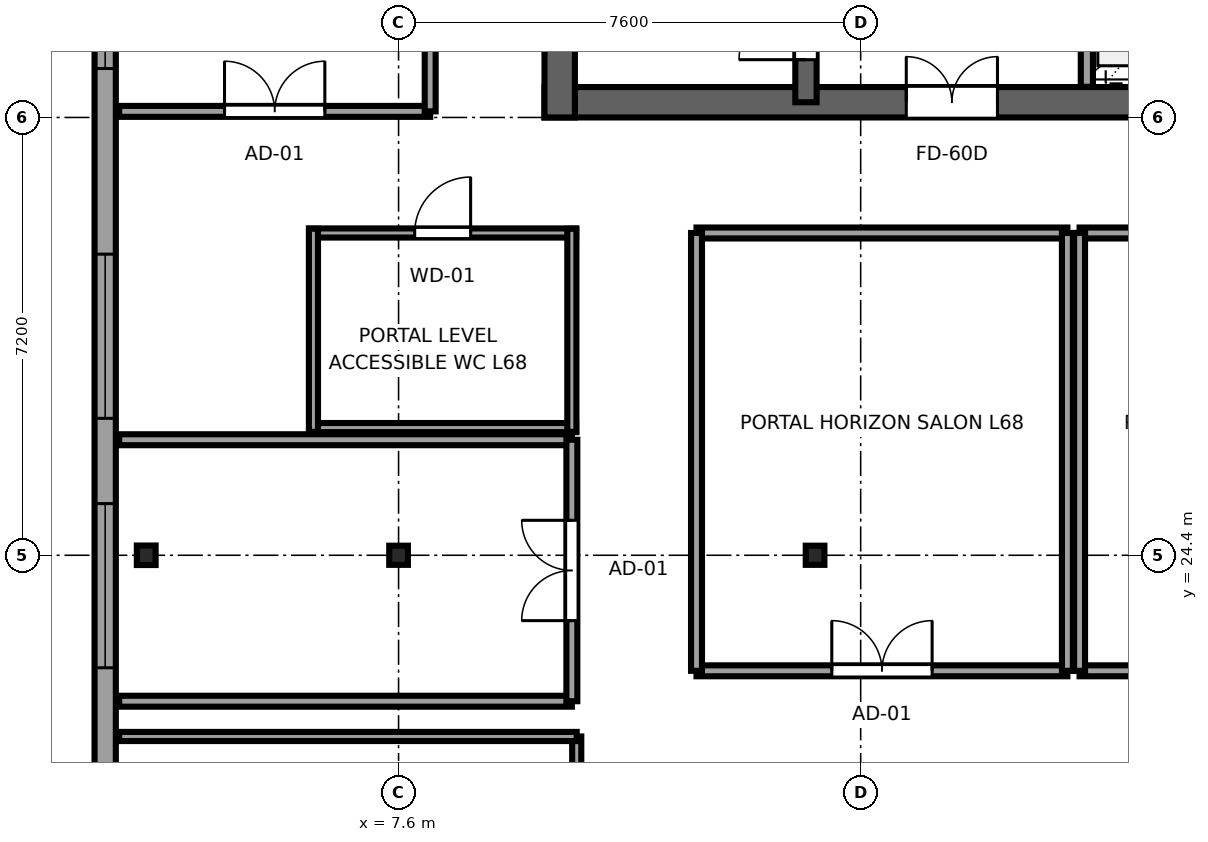
"""IFC4 building model, lengths in metres.
Left out: names, types, materials, properties, quantities, classifications, styles, units other than length and angle.
Written with IfcOpenShell. Run it as: python <this file> out.ifc"""

import sys

from ifc_helpers import new_model, si_unit, direction, frame, frame_2d, origin, origin_2d, place, context, subcontext, project, spatial, rectangle, i_section, extrude, source, transform, mapped, element, fill, save


model = new_model("IFC4")
c1 = context("Model", 3, precision=1e-05, world=origin(), true_north=direction((0.0, 1.0)))
c2 = subcontext(c1, "Body", "Model", "MODEL_VIEW")
j1 = project(units=[si_unit("LENGTHUNIT", "METRE"), si_unit("PLANEANGLEUNIT", "RADIAN")], contexts=[c1])
p1 = place(None, origin())
s1 = spatial("IfcSite", under=j1, at=p1, CompositionType="ELEMENT")
p2 = place(p1, origin())
s2 = spatial("IfcBuilding", under=s1, at=p2, CompositionType="ELEMENT")
p3 = place(p2, frame((0.0, 0.0, 255.85)))
s3 = spatial("IfcBuildingStorey", under=s2, at=p3, CompositionType="ELEMENT", Elevation=255.85)
p4 = place(p3, frame((10.0, 31.85, 0.0), z_axis=(0.0, 0.0, 1.0), x_axis=(1.0, 0.0, 0.0)))
e1 = element("IfcWall", 1, at=p4, inside=s3, PredefinedType="SHEAR", context=c2, shape_type="SweptSolid", body=[
    extrude(rectangle(XDim=26.0, YDim=0.5, at=frame_2d((13.0, 0.0))), origin(), (0.0, 0.0, 1.0), 3.55),
])
p5 = place(p4, frame((7.45, 0.0, 0.0), z_axis=(0.0, 0.0, 1.0), x_axis=(-1.0, 0.0, 0.0)))
e2 = element("IfcOpeningElement", 2, at=p5, cuts=e1, PredefinedType="OPENING", context=c2, shape_type="SweptSolid", body=[
    extrude(rectangle(XDim=1.5, YDim=2.04, at=frame_2d((0.75, 1.02))), frame((0.0, 0.26, 0.0), z_axis=(0.0, -1.0, 0.0), x_axis=(1.0, 0.0, 0.0)), (0.0, 0.0, 1.0), 0.52),
])
p6 = place(p4, frame((13.75, 0.0, 0.0), z_axis=(0.0, 0.0, 1.0), x_axis=(-1.0, 0.0, 0.0)))
e3 = element("IfcOpeningElement", 3, at=p6, cuts=e1, PredefinedType="OPENING", context=c2, shape_type="SweptSolid", body=[
    extrude(rectangle(XDim=1.5, YDim=2.04, at=frame_2d((0.75, 1.02))), frame((0.0, 0.26, 0.0), z_axis=(0.0, -1.0, 0.0), x_axis=(1.0, 0.0, 0.0)), (0.0, 0.0, 1.0), 0.52),
])
p7 = place(p4, frame((20.05, 0.0, 0.0), z_axis=(0.0, 0.0, 1.0), x_axis=(-1.0, 0.0, 0.0)))
e4 = element("IfcOpeningElement", 4, at=p7, cuts=e1, PredefinedType="OPENING", context=c2, shape_type="SweptSolid", body=[
    extrude(rectangle(XDim=1.5, YDim=2.04, at=frame_2d((0.75, 1.02))), frame((0.0, 0.26, 0.0), z_axis=(0.0, -1.0, 0.0), x_axis=(1.0, 0.0, 0.0)), (0.0, 0.0, 1.0), 0.52),
])
p8 = place(p3, frame((10.25, 31.6, 0.0), z_axis=(0.0, 0.0, 1.0), x_axis=(0.0, 1.0, 0.0)))
e5 = element("IfcWall", 5, at=p8, inside=s3, PredefinedType="SHEAR", context=c2, shape_type="SweptSolid", body=[
    extrude(rectangle(XDim=13.6, YDim=0.5, at=frame_2d((6.8, 0.0))), origin(), (0.0, 0.0, 1.0), 3.55),
])
p9 = place(p3, frame((14.3, 31.85, 0.0), z_axis=(0.0, 0.0, 1.0), x_axis=(0.0, 1.0, 0.0)))
e6 = element("IfcWall", 6, at=p9, inside=s3, PredefinedType="SHEAR", context=c2, shape_type="SweptSolid", body=[
    extrude(rectangle(XDim=13.1, YDim=0.35, at=frame_2d((6.55, 0.0))), origin(), (0.0, 0.0, 1.0), 3.55),
])
p10 = place(p9, frame((0.7, 0.0, 0.0)))
e7 = element("IfcOpeningElement", 7, at=p10, cuts=e6, PredefinedType="OPENING", context=c2, shape_type="SweptSolid", body=[
    extrude(rectangle(XDim=1.1, YDim=2.12, at=frame_2d((0.55, 1.06))), frame((0.0, 0.185, 0.0), z_axis=(0.0, -1.0, 0.0), x_axis=(1.0, 0.0, 0.0)), (0.0, 0.0, 1.0), 0.37),
])
m1 = source(origin(), c2, "Body", "SweptSolid", [
    extrude(i_section(OverallWidth=0.309, OverallDepth=0.321, WebThickness=0.014, FlangeThickness=0.022, FilletRadius=0.017, at=origin_2d()), origin(), (0.0, 0.0, 1.0), 3.55),
])
p11 = place(p3, frame((3.45, 24.4, 0.0), z_axis=(0.0, 0.0, 1.0), x_axis=(1.0, 0.0, 0.0)))
e8 = element("IfcColumn", 8, at=p11, inside=s3, PredefinedType="COLUMN", context=c2, shape_type="MappedRepresentation", body=[
    mapped(m1, transform((0.0, 0.0, 0.0), x_axis=(1.0, 0.0, 0.0), y_axis=(0.0, 1.0, 0.0), z_axis=(0.0, 0.0, 1.0), scale=1.0)),
])
m2 = source(origin(), c2, "Body", "SweptSolid", [
    extrude(i_section(OverallWidth=0.307, OverallDepth=0.315, WebThickness=0.012, FlangeThickness=0.019, FilletRadius=0.017, at=origin_2d()), origin(), (0.0, 0.0, 1.0), 3.55),
])
for number, where, z_axis, x_axis in (
    (9, (7.6, 24.4, 0.0), (0.0, 0.0, 1.0), (1.0, 0.0, 0.0)),
    (10, (14.45, 24.4, 0.0), (0.0, 0.0, 1.0), (1.0, 0.0, 0.0)),
):
    element("IfcColumn", number, at=place(p3, frame(where, z_axis=z_axis, x_axis=x_axis)), inside=s3, PredefinedType="COLUMN", context=c2, shape_type="MappedRepresentation", body=[
        mapped(m2, transform((0.0, 0.0, 0.0), x_axis=(1.0, 0.0, 0.0), y_axis=(0.0, 1.0, 0.0), z_axis=(0.0, 0.0, 1.0), scale=1.0)),
    ])
p12 = place(p3, frame((2.775, 40.783, 0.0), z_axis=(0.0, 0.0, 1.0), x_axis=(0.0, -1.0, 0.0)))
e11 = element("IfcWall", 11, at=p12, inside=s3, PredefinedType="SOLIDWALL", context=c2, shape_type="SweptSolid", body=[
    extrude(rectangle(XDim=33.766, YDim=0.35, at=frame_2d((16.883, 0.0))), origin(), (0.0, 0.0, 1.0), 3.37),
])
p13 = place(p12, frame((5.678, 0.0, 0.68)))
e12 = element("IfcOpeningElement", 12, at=p13, cuts=e11, PredefinedType="OPENING", context=c2, shape_type="SweptSolid", body=[
    extrude(rectangle(XDim=2.7, YDim=1.95, at=frame_2d((1.35, 0.975))), frame((0.0, 0.185, 0.0), z_axis=(0.0, -1.0, 0.0), x_axis=(1.0, 0.0, 0.0)), (0.0, 0.0, 1.0), 0.37),
])
p14 = place(p12, frame((11.431, 0.0, 0.68)))
e13 = element("IfcOpeningElement", 13, at=p14, cuts=e11, PredefinedType="OPENING", context=c2, shape_type="SweptSolid", body=[
    extrude(rectangle(XDim=2.7, YDim=1.95, at=frame_2d((1.35, 0.975))), frame((0.0, 0.185, 0.0), z_axis=(0.0, -1.0, 0.0), x_axis=(1.0, 0.0, 0.0)), (0.0, 0.0, 1.0), 0.37),
])
p15 = place(p12, frame((15.533, 0.0, 0.68)))
e14 = element("IfcOpeningElement", 14, at=p15, cuts=e11, PredefinedType="OPENING", context=c2, shape_type="SweptSolid", body=[
    extrude(rectangle(XDim=2.7, YDim=1.95, at=frame_2d((1.35, 0.975))), frame((0.0, 0.185, 0.0), z_axis=(0.0, -1.0, 0.0), x_axis=(1.0, 0.0, 0.0)), (0.0, 0.0, 1.0), 0.37),
])
p16 = place(p12, frame((20.185, 0.0, 0.68)))
e15 = element("IfcOpeningElement", 15, at=p16, cuts=e11, PredefinedType="OPENING", context=c2, shape_type="SweptSolid", body=[
    extrude(rectangle(XDim=2.7, YDim=1.95, at=frame_2d((1.35, 0.975))), frame((0.0, 0.185, 0.0), z_axis=(0.0, -1.0, 0.0), x_axis=(1.0, 0.0, 0.0)), (0.0, 0.0, 1.0), 0.37),
])
p17 = place(p12, frame((24.837, 0.0, 0.68)))
e16 = element("IfcOpeningElement", 16, at=p17, cuts=e11, PredefinedType="OPENING", context=c2, shape_type="SweptSolid", body=[
    extrude(rectangle(XDim=2.7, YDim=1.95, at=frame_2d((1.35, 0.975))), frame((0.0, 0.185, 0.0), z_axis=(0.0, -1.0, 0.0), x_axis=(1.0, 0.0, 0.0)), (0.0, 0.0, 1.0), 0.37),
])
p18 = place(p12, frame((29.489, 0.0, 0.68)))
e17 = element("IfcOpeningElement", 17, at=p18, cuts=e11, PredefinedType="OPENING", context=c2, shape_type="SweptSolid", body=[
    extrude(rectangle(XDim=2.7, YDim=1.95, at=frame_2d((1.35, 0.975))), frame((0.0, 0.185, 0.0), z_axis=(0.0, -1.0, 0.0), x_axis=(1.0, 0.0, 0.0)), (0.0, 0.0, 1.0), 0.37),
])
p19 = place(p3, frame((18.92, 32.104, 0.0), z_axis=(0.0, 0.0, 1.0), x_axis=(0.0, 1.0, 0.0)))
e18 = element("IfcWall", 18, at=p19, inside=s3, PredefinedType="SOLIDWALL", context=c2, shape_type="SweptSolid", body=[
    extrude(rectangle(XDim=4.046, YDim=0.2, at=frame_2d((2.023, 0.0))), origin(), (0.0, 0.0, 1.0), 3.37),
])
p20 = place(p3, frame((10.53, 14.61, 0.0), z_axis=(0.0, 0.0, 1.0), x_axis=(0.0, 1.0, 0.0)))
e19 = element("IfcWall", 19, at=p20, inside=s3, PredefinedType="PARTITIONING", context=c2, shape_type="SweptSolid", body=[
    extrude(rectangle(XDim=6.81, YDim=0.15, at=frame_2d((3.405, 0.0))), origin(), (0.0, 0.0, 1.0), 3.37),
])
p21 = place(p20, frame((2.775, 0.0, 0.0)))
e20 = element("IfcOpeningElement", 20, at=p21, cuts=e19, PredefinedType="OPENING", context=c2, shape_type="SweptSolid", body=[
    extrude(rectangle(XDim=1.22, YDim=2.08, at=frame_2d((0.61, 1.04))), frame((0.0, 0.085, 0.0), z_axis=(0.0, -1.0, 0.0), x_axis=(1.0, 0.0, 0.0)), (0.0, 0.0, 1.0), 0.17),
])
p22 = place(p3, frame((3.005, 21.42, 0.0), z_axis=(0.0, 0.0, 1.0), x_axis=(1.0, 0.0, 0.0)))
e21 = element("IfcWall", 21, at=p22, inside=s3, PredefinedType="PARTITIONING", context=c2, shape_type="SweptSolid", body=[
    extrude(rectangle(XDim=7.525, YDim=0.15, at=frame_2d((3.763, 0.0))), origin(), (0.0, 0.0, 1.0), 3.37),
])
p23 = place(p3, frame((12.5, 22.5, 0.0), z_axis=(0.0, 0.0, 1.0), x_axis=(1.0, 0.0, 0.0)))
e22 = element("IfcWall", 22, at=p23, inside=s3, PredefinedType="PARTITIONING", context=c2, shape_type="SweptSolid", body=[
    extrude(rectangle(XDim=6.1, YDim=0.18, at=frame_2d((3.05, 0.0))), origin(), (0.0, 0.0, 1.0), 3.37),
])
p24 = place(p23, frame((2.225, 0.0, 0.0)))
e23 = element("IfcOpeningElement", 23, at=p24, cuts=e22, PredefinedType="OPENING", context=c2, shape_type="SweptSolid", body=[
    extrude(rectangle(XDim=1.65, YDim=2.15, at=frame_2d((0.825, 1.075))), frame((0.0, 0.1, 0.0), z_axis=(0.0, -1.0, 0.0), x_axis=(1.0, 0.0, 0.0)), (0.0, 0.0, 1.0), 0.2),
])
p25 = place(p3, frame((12.5, 29.7, 0.0), z_axis=(0.0, 0.0, 1.0), x_axis=(1.0, 0.0, 0.0)))
e24 = element("IfcWall", 24, at=p25, inside=s3, PredefinedType="PARTITIONING", context=c2, shape_type="SweptSolid", body=[
    extrude(rectangle(XDim=6.1, YDim=0.18, at=frame_2d((3.05, 0.0))), origin(), (0.0, 0.0, 1.0), 3.37),
])
for number, where, z_axis, x_axis in (
    (25, (12.5, 22.5, 0.0), (0.0, 0.0, 1.0), (0.0, 1.0, 0.0)),
    (26, (18.6, 22.5, 0.0), (0.0, 0.0, 1.0), (0.0, 1.0, 0.0)),
):
    element("IfcWall", number, at=place(p3, frame(where, z_axis=z_axis, x_axis=x_axis)), inside=s3, PredefinedType="PARTITIONING", context=c2, shape_type="SweptSolid", body=[
        extrude(rectangle(XDim=7.2, YDim=0.18, at=frame_2d((3.6, 0.0))), origin(), (0.0, 0.0, 1.0), 3.37),
    ])
p26 = place(p3, frame((18.8, 22.5, 0.0), z_axis=(0.0, 0.0, 1.0), x_axis=(1.0, 0.0, 0.0)))
e27 = element("IfcWall", 27, at=p26, inside=s3, PredefinedType="PARTITIONING", context=c2, shape_type="SweptSolid", body=[
    extrude(rectangle(XDim=6.6, YDim=0.18, at=frame_2d((3.3, 0.0))), origin(), (0.0, 0.0, 1.0), 3.37),
])
p27 = place(p26, frame((2.475, 0.0, 0.0)))
e28 = element("IfcOpeningElement", 28, at=p27, cuts=e27, PredefinedType="OPENING", context=c2, shape_type="SweptSolid", body=[
    extrude(rectangle(XDim=1.65, YDim=2.15, at=frame_2d((0.825, 1.075))), frame((0.0, 0.1, 0.0), z_axis=(0.0, -1.0, 0.0), x_axis=(1.0, 0.0, 0.0)), (0.0, 0.0, 1.0), 0.2),
])
p28 = place(p3, frame((18.8, 29.7, 0.0), z_axis=(0.0, 0.0, 1.0), x_axis=(1.0, 0.0, 0.0)))
e29 = element("IfcWall", 29, at=p28, inside=s3, PredefinedType="PARTITIONING", context=c2, shape_type="SweptSolid", body=[
    extrude(rectangle(XDim=6.6, YDim=0.18, at=frame_2d((3.3, 0.0))), origin(), (0.0, 0.0, 1.0), 3.37),
])
p29 = place(p3, frame((18.8, 22.5, 0.0), z_axis=(0.0, 0.0, 1.0), x_axis=(0.0, 1.0, 0.0)))
e30 = element("IfcWall", 30, at=p29, inside=s3, PredefinedType="PARTITIONING", context=c2, shape_type="SweptSolid", body=[
    extrude(rectangle(XDim=7.2, YDim=0.18, at=frame_2d((3.6, 0.0))), origin(), (0.0, 0.0, 1.0), 3.37),
])
for number, where, z_axis, x_axis in (
    (31, (3.005, 22.0, 0.0), (0.0, 0.0, 1.0), (1.0, 0.0, 0.0)),
    (32, (3.005, 26.3, 0.0), (0.0, 0.0, 1.0), (1.0, 0.0, 0.0)),
):
    element("IfcWall", number, at=place(p3, frame(where, z_axis=z_axis, x_axis=x_axis)), inside=s3, PredefinedType="PARTITIONING", context=c2, shape_type="SweptSolid", body=[
        extrude(rectangle(XDim=7.445, YDim=0.18, at=frame_2d((3.723, 0.0))), origin(), (0.0, 0.0, 1.0), 3.37),
    ])
p30 = place(p3, frame((10.45, 22.0, 0.0), z_axis=(0.0, 0.0, 1.0), x_axis=(0.0, 1.0, 0.0)))
e33 = element("IfcWall", 33, at=p30, inside=s3, PredefinedType="PARTITIONING", context=c2, shape_type="SweptSolid", body=[
    extrude(rectangle(XDim=4.3, YDim=0.18, at=frame_2d((2.15, 0.0))), origin(), (0.0, 0.0, 1.0), 3.37),
])
p31 = place(p30, frame((1.325, 0.0, 0.0)))
e34 = element("IfcOpeningElement", 34, at=p31, cuts=e33, PredefinedType="OPENING", context=c2, shape_type="SweptSolid", body=[
    extrude(rectangle(XDim=1.65, YDim=2.15, at=frame_2d((0.825, 1.075))), frame((0.0, 0.1, 0.0), z_axis=(0.0, -1.0, 0.0), x_axis=(1.0, 0.0, 0.0)), (0.0, 0.0, 1.0), 0.2),
])
p32 = place(p3, frame((6.13, 26.5, 0.0), z_axis=(0.0, 0.0, 1.0), x_axis=(1.0, 0.0, 0.0)))
e35 = element("IfcWall", 35, at=p32, inside=s3, PredefinedType="PARTITIONING", context=c2, shape_type="SweptSolid", body=[
    extrude(rectangle(XDim=4.39, YDim=0.15, at=frame_2d((2.195, 0.0))), origin(), (0.0, 0.0, 1.0), 3.37),
])
p33 = place(p3, frame((6.13, 29.7, 0.0), z_axis=(0.0, 0.0, 1.0), x_axis=(1.0, 0.0, 0.0)))
e36 = element("IfcWall", 36, at=p33, inside=s3, PredefinedType="PARTITIONING", context=c2, shape_type="SweptSolid", body=[
    extrude(rectangle(XDim=4.39, YDim=0.15, at=frame_2d((2.195, 0.0))), origin(), (0.0, 0.0, 1.0), 3.37),
])
p34 = place(p33, frame((1.735, 0.0, 0.0)))
e37 = element("IfcOpeningElement", 37, at=p34, cuts=e36, PredefinedType="OPENING", context=c2, shape_type="SweptSolid", body=[
    extrude(rectangle(XDim=0.92, YDim=2.01, at=frame_2d((0.46, 1.005))), frame((0.0, 0.085, 0.0), z_axis=(0.0, -1.0, 0.0), x_axis=(1.0, 0.0, 0.0)), (0.0, 0.0, 1.0), 0.17),
])
for number, where, z_axis, x_axis in (
    (38, (6.2, 26.43, 0.0), (0.0, 0.0, 1.0), (0.0, 1.0, 0.0)),
    (39, (10.45, 26.43, 0.0), (0.0, 0.0, 1.0), (0.0, 1.0, 0.0)),
):
    element("IfcWall", number, at=place(p3, frame(where, z_axis=z_axis, x_axis=x_axis)), inside=s3, PredefinedType="PARTITIONING", context=c2, shape_type="SweptSolid", body=[
        extrude(rectangle(XDim=3.34, YDim=0.15, at=frame_2d((1.67, 0.0))), origin(), (0.0, 0.0, 1.0), 3.37),
    ])
p35 = place(p3, frame((3.005, 31.7, 0.0), z_axis=(0.0, 0.0, 1.0), x_axis=(1.0, 0.0, 0.0)))
e40 = element("IfcWall", 40, at=p35, inside=s3, PredefinedType="PARTITIONING", context=c2, shape_type="SweptSolid", body=[
    extrude(rectangle(XDim=5.115, YDim=0.18, at=frame_2d((2.558, 0.0))), origin(), (0.0, 0.0, 1.0), 3.37),
])
p36 = place(p35, frame((1.732, 0.0, 0.0)))
e41 = element("IfcOpeningElement", 41, at=p36, cuts=e40, PredefinedType="OPENING", context=c2, shape_type="SweptSolid", body=[
    extrude(rectangle(XDim=1.65, YDim=2.15, at=frame_2d((0.825, 1.075))), frame((0.0, 0.1, 0.0), z_axis=(0.0, -1.0, 0.0), x_axis=(1.0, 0.0, 0.0)), (0.0, 0.0, 1.0), 0.2),
])
p37 = place(p3, frame((8.12, 31.7, 0.0), z_axis=(0.0, 0.0, 1.0), x_axis=(0.0, 1.0, 0.0)))
e42 = element("IfcWall", 42, at=p37, inside=s3, PredefinedType="PARTITIONING", context=c2, shape_type="SweptSolid", body=[
    extrude(rectangle(XDim=6.1, YDim=0.18, at=frame_2d((3.05, 0.0))), origin(), (0.0, 0.0, 1.0), 3.37),
])
m3 = source(origin(), c2, "Body", "SweptSolid", [
    extrude(rectangle(XDim=2.7, YDim=1.95, at=frame_2d((1.35, 0.975))), frame((0.0, 0.09, 0.0), z_axis=(0.0, -1.0, 0.0), x_axis=(1.0, 0.0, 0.0)), (0.0, 0.0, 1.0), 0.06),
])
p38 = place(p13, origin())
e43 = element("IfcWindow", 43, at=p38, inside=s3, PartitioningType="TRIPLE_PANEL_HORIZONTAL", PredefinedType="WINDOW", context=c2, shape_type="MappedRepresentation", body=[
    mapped(m3, transform((0.0, 0.0, 0.0), x_axis=(1.0, 0.0, 0.0), y_axis=(0.0, 1.0, 0.0), z_axis=(0.0, 0.0, 1.0), scale=1.0)),
])
fill(e12, e43)
p39 = place(p14, origin())
e44 = element("IfcWindow", 44, at=p39, inside=s3, PartitioningType="TRIPLE_PANEL_HORIZONTAL", PredefinedType="WINDOW", context=c2, shape_type="MappedRepresentation", body=[
    mapped(m3, transform((0.0, 0.0, 0.0), x_axis=(1.0, 0.0, 0.0), y_axis=(0.0, 1.0, 0.0), z_axis=(0.0, 0.0, 1.0), scale=1.0)),
])
fill(e13, e44)
p40 = place(p15, origin())
e45 = element("IfcWindow", 45, at=p40, inside=s3, PartitioningType="TRIPLE_PANEL_HORIZONTAL", PredefinedType="WINDOW", context=c2, shape_type="MappedRepresentation", body=[
    mapped(m3, transform((0.0, 0.0, 0.0), x_axis=(1.0, 0.0, 0.0), y_axis=(0.0, 1.0, 0.0), z_axis=(0.0, 0.0, 1.0), scale=1.0)),
])
fill(e14, e45)
m4 = source(origin(), c2, "Body", "SweptSolid", [
    extrude(rectangle(XDim=1.1, YDim=2.12, at=frame_2d((0.55, 1.06))), frame((0.0, 0.025, 0.0), z_axis=(0.0, -1.0, 0.0), x_axis=(1.0, 0.0, 0.0)), (0.0, 0.0, 1.0), 0.05),
])
p41 = place(p10, origin())
e46 = element("IfcDoor", 46, at=p41, inside=s3, OperationType="SINGLE_SWING_LEFT", PredefinedType="DOOR", context=c2, shape_type="MappedRepresentation", body=[
    mapped(m4, transform((0.0, 0.0, 0.0), x_axis=(1.0, 0.0, 0.0), y_axis=(0.0, 1.0, 0.0), z_axis=(0.0, 0.0, 1.0), scale=1.0)),
])
fill(e7, e46)
m5 = source(origin(), c2, "Body", "SweptSolid", [
    extrude(rectangle(XDim=1.5, YDim=2.04, at=frame_2d((0.75, 1.02))), frame((0.0, 0.025, 0.0), z_axis=(0.0, -1.0, 0.0), x_axis=(1.0, 0.0, 0.0)), (0.0, 0.0, 1.0), 0.05),
])
p42 = place(p5, origin())
e47 = element("IfcDoor", 47, at=p42, inside=s3, OperationType="DOUBLE_DOOR_SINGLE_SWING", PredefinedType="DOOR", context=c2, shape_type="MappedRepresentation", body=[
    mapped(m5, transform((0.0, 0.0, 0.0), x_axis=(1.0, 0.0, 0.0), y_axis=(0.0, 1.0, 0.0), z_axis=(0.0, 0.0, 1.0), scale=1.0)),
])
fill(e2, e47)
m6 = source(origin(), c2, "Body", "SweptSolid", [
    extrude(rectangle(XDim=1.65, YDim=2.15, at=frame_2d((0.825, 1.075))), frame((0.0, 0.025, 0.0), z_axis=(0.0, -1.0, 0.0), x_axis=(1.0, 0.0, 0.0)), (0.0, 0.0, 1.0), 0.05),
])
p43 = place(p24, origin())
e48 = element("IfcDoor", 48, at=p43, inside=s3, OperationType="DOUBLE_DOOR_SINGLE_SWING", PredefinedType="DOOR", context=c2, shape_type="MappedRepresentation", body=[
    mapped(m6, transform((0.0, 0.0, 0.0), x_axis=(1.0, 0.0, 0.0), y_axis=(0.0, 1.0, 0.0), z_axis=(0.0, 0.0, 1.0), scale=1.0)),
])
fill(e23, e48)
p44 = place(p31, origin())
e49 = element("IfcDoor", 49, at=p44, inside=s3, OperationType="DOUBLE_DOOR_SINGLE_SWING", PredefinedType="DOOR", context=c2, shape_type="MappedRepresentation", body=[
    mapped(m6, transform((0.0, 0.0, 0.0), x_axis=(1.0, 0.0, 0.0), y_axis=(0.0, 1.0, 0.0), z_axis=(0.0, 0.0, 1.0), scale=1.0)),
])
fill(e34, e49)
m7 = source(origin(), c2, "Body", "SweptSolid", [
    extrude(rectangle(XDim=0.92, YDim=2.01, at=frame_2d((0.46, 1.005))), frame((0.0, 0.025, 0.0), z_axis=(0.0, -1.0, 0.0), x_axis=(1.0, 0.0, 0.0)), (0.0, 0.0, 1.0), 0.05),
])
p45 = place(p34, origin())
e50 = element("IfcDoor", 50, at=p45, inside=s3, OperationType="SINGLE_SWING_RIGHT", PredefinedType="DOOR", context=c2, shape_type="MappedRepresentation", body=[
    mapped(m7, transform((0.0, 0.0, 0.0), x_axis=(1.0, 0.0, 0.0), y_axis=(0.0, 1.0, 0.0), z_axis=(0.0, 0.0, 1.0), scale=1.0)),
])
fill(e37, e50)
p46 = place(p36, origin())
e51 = element("IfcDoor", 51, at=p46, inside=s3, OperationType="DOUBLE_DOOR_SINGLE_SWING", PredefinedType="DOOR", context=c2, shape_type="MappedRepresentation", body=[
    mapped(m6, transform((0.0, 0.0, 0.0), x_axis=(1.0, 0.0, 0.0), y_axis=(0.0, 1.0, 0.0), z_axis=(0.0, 0.0, 1.0), scale=1.0)),
])
fill(e41, e51)
save(model, sys.argv[1])
